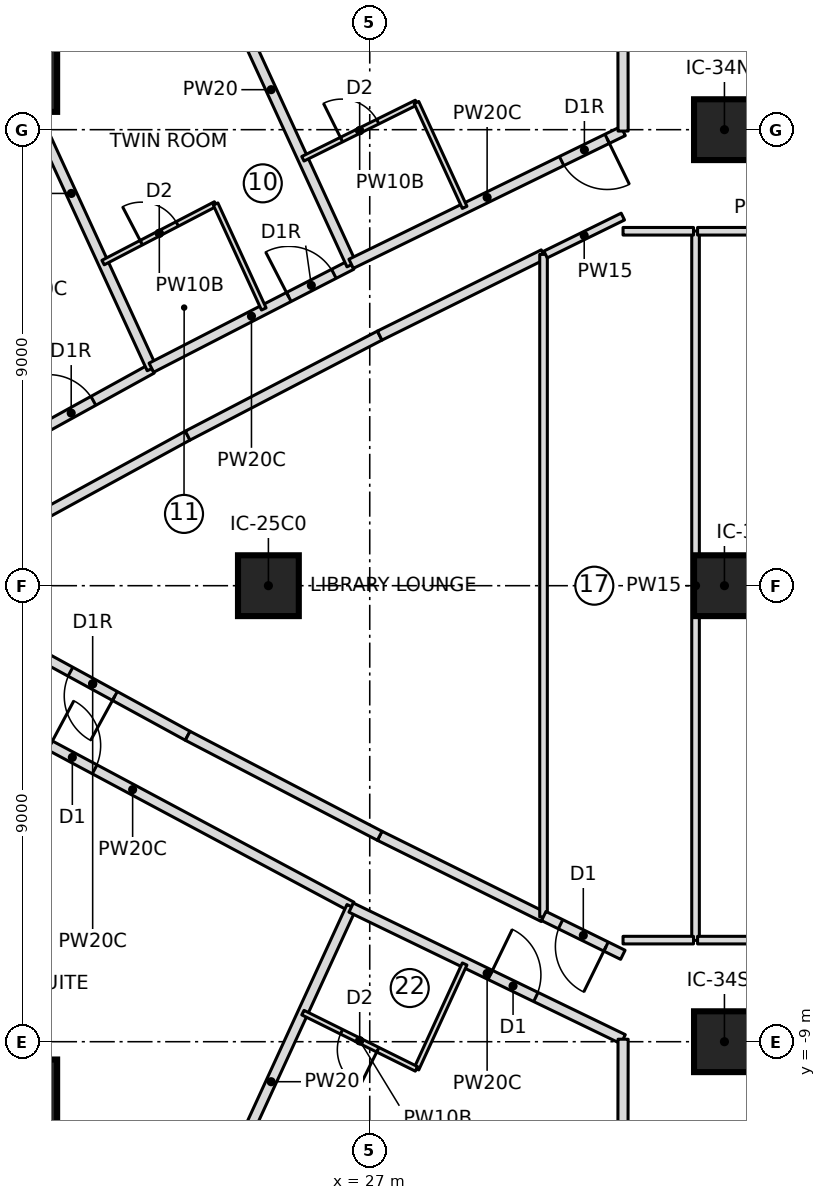
"""IFC4 building model, lengths in metres.
Left out: names, types, materials, properties, quantities, classifications, styles, units other than length and angle.
Written with IfcOpenShell. Run it as: python <this file> out.ifc"""

import sys

from ifc_helpers import new_model, si_unit, direction, frame, frame_2d, origin, origin_2d, place, context, subcontext, project, spatial, rectangle, extrude, element, fill, save


model = new_model("IFC4")
c1 = context("Model", 3, precision=1e-05, world=origin(), true_north=direction((0.0, 1.0)))
c2 = subcontext(c1, "Body", "Model", "MODEL_VIEW")
j1 = project(units=[si_unit("LENGTHUNIT", "METRE"), si_unit("PLANEANGLEUNIT", "RADIAN")], contexts=[c1])
p1 = place(None, origin())
s1 = spatial("IfcSite", under=j1, at=p1, CompositionType="ELEMENT")
p2 = place(p1, origin())
s2 = spatial("IfcBuilding", under=s1, at=p2, CompositionType="ELEMENT")
p3 = place(p2, frame((0.0, 0.0, 84.9)))
s3 = spatial("IfcBuildingStorey", under=s2, at=p3, CompositionType="ELEMENT", Elevation=84.9)
for number, where, z_axis, x_axis in (
    (1, (19.981, -10.202, 0.0), (0.0, 0.0, 1.0), (1.0, 0.0, 0.0)),
    (2, (19.981, 10.202, 0.0), (0.0, 0.0, 1.0), (1.0, 0.0, 0.0)),
):
    element("IfcColumn", number, at=place(p3, frame(where, z_axis=z_axis, x_axis=x_axis)), inside=s3, PredefinedType="COLUMN", context=c2, shape_type="SweptSolid", body=[
        extrude(rectangle(XDim=1.7, YDim=1.7, at=origin_2d()), origin(), (0.0, 0.0, 1.0), 3.55),
    ])
for number, where, z_axis, x_axis in (
    (3, (25.0, 0.0, 0.0), (0.0, 0.0, 1.0), (1.0, 0.0, 0.0)),
    (4, (34.0, -9.0, 0.0), (0.0, 0.0, 1.0), (1.0, 0.0, 0.0)),
    (5, (34.0, 0.0, 0.0), (0.0, 0.0, 1.0), (1.0, 0.0, 0.0)),
    (6, (34.0, 9.0, 0.0), (0.0, 0.0, 1.0), (1.0, 0.0, 0.0)),
):
    element("IfcColumn", number, at=place(p3, frame(where, z_axis=z_axis, x_axis=x_axis)), inside=s3, PredefinedType="COLUMN", context=c2, shape_type="SweptSolid", body=[
        extrude(rectangle(XDim=1.2, YDim=1.2, at=origin_2d()), origin(), (0.0, 0.0, 1.0), 3.55),
    ])
p4 = place(p3, frame((18.0, 1.692, 0.0), z_axis=(0.0, 0.0, 1.0), x_axis=(0.875548487611, 0.483130257634, 0.0)))
e7 = element("IfcWall", 7, at=p4, inside=s3, PredefinedType="PARTITIONING", context=c2, shape_type="SweptSolid", body=[
    extrude(rectangle(XDim=5.367, YDim=0.2, at=frame_2d((2.683, 0.0))), origin(), (0.0, 0.0, 1.0), 3.25),
])
p5 = place(p4, frame((3.05, 0.0, 0.0)))
e8 = element("IfcOpeningElement", 8, at=p5, cuts=e7, PredefinedType="OPENING", context=c2, shape_type="SweptSolid", body=[
    extrude(rectangle(XDim=1.0, YDim=2.1, at=frame_2d((0.5, 1.05))), frame((0.0, 0.11, 0.0), z_axis=(0.0, -1.0, 0.0), x_axis=(1.0, 0.0, 0.0)), (0.0, 0.0, 1.0), 0.22),
])
p6 = place(p3, frame((22.699, 4.284, 0.0), z_axis=(0.0, 0.0, 1.0), x_axis=(-0.417413534969, 0.908716644959, 0.0)))
e9 = element("IfcWall", 9, at=p6, inside=s3, PredefinedType="PARTITIONING", context=c2, shape_type="SweptSolid", body=[
    extrude(rectangle(XDim=7.609, YDim=0.2, at=frame_2d((3.805, 0.0))), origin(), (0.0, 0.0, 1.0), 3.25),
])
p7 = place(p3, frame((22.69, 4.302, 0.0), z_axis=(0.0, 0.0, 1.0), x_axis=(0.889236075961, 0.457448577667, 0.0)))
e10 = element("IfcWall", 10, at=p7, inside=s3, PredefinedType="PARTITIONING", context=c2, shape_type="SweptSolid", body=[
    extrude(rectangle(XDim=4.443, YDim=0.2, at=frame_2d((2.222, 0.0))), origin(), (0.0, 0.0, 1.0), 3.25),
])
p8 = place(p7, frame((3.05, 0.0, 0.0)))
e11 = element("IfcOpeningElement", 11, at=p8, cuts=e10, PredefinedType="OPENING", context=c2, shape_type="SweptSolid", body=[
    extrude(rectangle(XDim=1.0, YDim=2.1, at=frame_2d((0.5, 1.05))), frame((0.0, 0.11, 0.0), z_axis=(0.0, -1.0, 0.0), x_axis=(1.0, 0.0, 0.0)), (0.0, 0.0, 1.0), 0.22),
])
p9 = place(p3, frame((21.738, 6.377, 0.0), z_axis=(0.0, 0.0, 1.0), x_axis=(0.886911586599, 0.461939214135, 0.0)))
e12 = element("IfcWall", 12, at=p9, inside=s3, PredefinedType="PARTITIONING", context=c2, shape_type="SweptSolid", body=[
    extrude(rectangle(XDim=2.503, YDim=0.1, at=frame_2d((1.251, 0.0))), origin(), (0.0, 0.0, 1.0), 3.25),
])
p10 = place(p9, frame((0.85, 0.0, 0.0)))
e13 = element("IfcOpeningElement", 13, at=p10, cuts=e12, PredefinedType="OPENING", context=c2, shape_type="SweptSolid", body=[
    extrude(rectangle(XDim=0.8, YDim=2.1, at=frame_2d((0.4, 1.05))), frame((0.0, 0.06, 0.0), z_axis=(0.0, -1.0, 0.0), x_axis=(1.0, 0.0, 0.0)), (0.0, 0.0, 1.0), 0.12),
])
p11 = place(p3, frame((23.958, 7.533, 0.0), z_axis=(0.0, 0.0, 1.0), x_axis=(0.417454762401, -0.908697706253, 0.0)))
e14 = element("IfcWall", 14, at=p11, inside=s3, PredefinedType="PARTITIONING", context=c2, shape_type="SweptSolid", body=[
    extrude(rectangle(XDim=2.28, YDim=0.1, at=frame_2d((1.14, 0.0))), origin(), (0.0, 0.0, 1.0), 3.25),
])
p12 = place(p3, frame((26.641, 6.335, 0.0), z_axis=(0.0, 0.0, 1.0), x_axis=(-0.417455028008, 0.908697584233, 0.0)))
e15 = element("IfcWall", 15, at=p12, inside=s3, PredefinedType="PARTITIONING", context=c2, shape_type="SweptSolid", body=[
    extrude(rectangle(XDim=7.603, YDim=0.2, at=frame_2d((3.802, 0.0))), origin(), (0.0, 0.0, 1.0), 3.25),
])
p13 = place(p3, frame((32.0, 8.973, 0.0), z_axis=(0.0, 0.0, 1.0), x_axis=(-0.898654091263, -0.438657980956, 0.0)))
e16 = element("IfcWall", 16, at=p13, inside=s3, PredefinedType="PARTITIONING", context=c2, shape_type="SweptSolid", body=[
    extrude(rectangle(XDim=5.972, YDim=0.2, at=frame_2d((2.986, 0.0))), origin(), (0.0, 0.0, 1.0), 3.25),
])
p14 = place(p13, frame((0.35, 0.0, 0.0)))
e17 = element("IfcOpeningElement", 17, at=p14, cuts=e16, PredefinedType="OPENING", context=c2, shape_type="SweptSolid", body=[
    extrude(rectangle(XDim=1.0, YDim=2.1, at=frame_2d((0.5, 1.05))), frame((0.0, 0.11, 0.0), z_axis=(0.0, -1.0, 0.0), x_axis=(1.0, 0.0, 0.0)), (0.0, 0.0, 1.0), 0.22),
])
p15 = place(p3, frame((25.681, 8.426, 0.0), z_axis=(0.0, 0.0, 1.0), x_axis=(0.895944857815, 0.444165297784, 0.0)))
e18 = element("IfcWall", 18, at=p15, inside=s3, PredefinedType="PARTITIONING", context=c2, shape_type="SweptSolid", body=[
    extrude(rectangle(XDim=2.501, YDim=0.1, at=frame_2d((1.25, 0.0))), origin(), (0.0, 0.0, 1.0), 3.25),
])
p16 = place(p15, frame((0.85, 0.0, 0.0)))
e19 = element("IfcOpeningElement", 19, at=p16, cuts=e18, PredefinedType="OPENING", context=c2, shape_type="SweptSolid", body=[
    extrude(rectangle(XDim=0.8, YDim=2.1, at=frame_2d((0.4, 1.05))), frame((0.0, 0.06, 0.0), z_axis=(0.0, -1.0, 0.0), x_axis=(1.0, 0.0, 0.0)), (0.0, 0.0, 1.0), 0.12),
])
p17 = place(p3, frame((27.922, 9.537, 0.0), z_axis=(0.0, 0.0, 1.0), x_axis=(0.417433204355, -0.908707609686, 0.0)))
e20 = element("IfcWall", 20, at=p17, inside=s3, PredefinedType="PARTITIONING", context=c2, shape_type="SweptSolid", body=[
    extrude(rectangle(XDim=2.278, YDim=0.1, at=frame_2d((1.139, 0.0))), origin(), (0.0, 0.0, 1.0), 3.25),
])
p18 = place(p3, frame((18.0, -1.715, 0.0), z_axis=(0.0, 0.0, 1.0), x_axis=(0.881859333365, -0.471512583244, 0.0)))
e21 = element("IfcWall", 21, at=p18, inside=s3, PredefinedType="PARTITIONING", context=c2, shape_type="SweptSolid", body=[
    extrude(rectangle(XDim=9.799, YDim=0.2, at=frame_2d((4.899, 0.0))), origin(), (0.0, 0.0, 1.0), 3.25),
])
p19 = place(p18, frame((3.05, 0.0, 0.0)))
e22 = element("IfcOpeningElement", 22, at=p19, cuts=e21, PredefinedType="OPENING", context=c2, shape_type="SweptSolid", body=[
    extrude(rectangle(XDim=1.0, YDim=2.1, at=frame_2d((0.5, 1.05))), frame((0.0, 0.11, 0.0), z_axis=(0.0, -1.0, 0.0), x_axis=(1.0, 0.0, 0.0)), (0.0, 0.0, 1.0), 0.22),
])
p20 = place(p3, frame((23.467, -13.244, 0.0), z_axis=(0.0, 0.0, 1.0), x_axis=(0.417455028008, 0.908697584233, 0.0)))
e23 = element("IfcWall", 23, at=p20, inside=s3, PredefinedType="PARTITIONING", context=c2, shape_type="SweptSolid", body=[
    extrude(rectangle(XDim=7.603, YDim=0.2, at=frame_2d((3.802, 0.0))), origin(), (0.0, 0.0, 1.0), 3.25),
])
p21 = place(p3, frame((26.633, -6.353, 0.0), z_axis=(0.0, 0.0, 1.0), x_axis=(0.900101763883, -0.435679715679, 0.0)))
e24 = element("IfcWall", 24, at=p21, inside=s3, PredefinedType="PARTITIONING", context=c2, shape_type="SweptSolid", body=[
    extrude(rectangle(XDim=5.963, YDim=0.2, at=frame_2d((2.981, 0.0))), origin(), (0.0, 0.0, 1.0), 3.25),
])
p22 = place(p21, frame((3.05, 0.0, 0.0)))
e25 = element("IfcOpeningElement", 25, at=p22, cuts=e24, PredefinedType="OPENING", context=c2, shape_type="SweptSolid", body=[
    extrude(rectangle(XDim=1.0, YDim=2.1, at=frame_2d((0.5, 1.05))), frame((0.0, 0.11, 0.0), z_axis=(0.0, -1.0, 0.0), x_axis=(1.0, 0.0, 0.0)), (0.0, 0.0, 1.0), 0.22),
])
p23 = place(p3, frame((28.873, -7.467, 0.0), z_axis=(0.0, 0.0, 1.0), x_axis=(-0.417433204355, -0.908707609686, 0.0)))
e26 = element("IfcWall", 26, at=p23, inside=s3, PredefinedType="PARTITIONING", context=c2, shape_type="SweptSolid", body=[
    extrude(rectangle(XDim=2.278, YDim=0.1, at=frame_2d((1.139, 0.0))), origin(), (0.0, 0.0, 1.0), 3.25),
])
p24 = place(p3, frame((27.922, -9.537, 0.0), z_axis=(0.0, 0.0, 1.0), x_axis=(-0.895944857815, 0.444165297784, 0.0)))
e27 = element("IfcWall", 27, at=p24, inside=s3, PredefinedType="PARTITIONING", context=c2, shape_type="SweptSolid", body=[
    extrude(rectangle(XDim=2.501, YDim=0.1, at=frame_2d((1.25, 0.0))), origin(), (0.0, 0.0, 1.0), 3.25),
])
p25 = place(p24, frame((0.85, 0.0, 0.0)))
e28 = element("IfcOpeningElement", 28, at=p25, cuts=e27, PredefinedType="OPENING", context=c2, shape_type="SweptSolid", body=[
    extrude(rectangle(XDim=0.8, YDim=2.1, at=frame_2d((0.4, 1.05))), frame((0.0, 0.06, 0.0), z_axis=(0.0, -1.0, 0.0), x_axis=(1.0, 0.0, 0.0)), (0.0, 0.0, 1.0), 0.12),
])
p26 = place(p3, frame((23.407, -2.962, 0.0), z_axis=(0.0, 0.0, 1.0), x_axis=(-0.877465075585, 0.479640533242, 0.0)))
e29 = element("IfcWall", 29, at=p26, inside=s3, PredefinedType="PARTITIONING", context=c2, shape_type="SweptSolid", body=[
    extrude(rectangle(XDim=4.273, YDim=0.2, at=frame_2d((2.137, 0.0))), origin(), (0.0, 0.0, 1.0), 3.25),
])
p27 = place(p26, frame((1.636, 0.0, 0.0)))
e30 = element("IfcOpeningElement", 30, at=p27, cuts=e29, PredefinedType="OPENING", context=c2, shape_type="SweptSolid", body=[
    extrude(rectangle(XDim=1.0, YDim=2.1, at=frame_2d((0.5, 1.05))), frame((0.0, 0.11, 0.0), z_axis=(0.0, -1.0, 0.0), x_axis=(1.0, 0.0, 0.0)), (0.0, 0.0, 1.0), 0.22),
])
p28 = place(p3, frame((30.43, -6.539, 0.0), z_axis=(0.0, 0.0, 1.0), x_axis=(-0.895964304417, 0.44412606905, 0.0)))
e31 = element("IfcWall", 31, at=p28, inside=s3, PredefinedType="PARTITIONING", context=c2, shape_type="SweptSolid", body=[
    extrude(rectangle(XDim=3.609, YDim=0.2, at=frame_2d((1.804, 0.0))), origin(), (0.0, 0.0, 1.0), 3.25),
])
p29 = place(p3, frame((27.196, -4.936, 0.0), z_axis=(0.0, 0.0, 1.0), x_axis=(-0.886899452904, 0.461962509775, 0.0)))
e32 = element("IfcWall", 32, at=p29, inside=s3, PredefinedType="PARTITIONING", context=c2, shape_type="SweptSolid", body=[
    extrude(rectangle(XDim=4.273, YDim=0.2, at=frame_2d((2.136, 0.0))), origin(), (0.0, 0.0, 1.0), 3.25),
])
p30 = place(p3, frame((19.657, 0.912, 0.0), z_axis=(0.0, 0.0, 1.0), x_axis=(0.877465075585, 0.479640533242, 0.0)))
e33 = element("IfcWall", 33, at=p30, inside=s3, PredefinedType="PARTITIONING", context=c2, shape_type="SweptSolid", body=[
    extrude(rectangle(XDim=4.273, YDim=0.2, at=frame_2d((2.137, 0.0))), origin(), (0.0, 0.0, 1.0), 3.25),
])
p31 = place(p3, frame((23.407, 2.962, 0.0), z_axis=(0.0, 0.0, 1.0), x_axis=(0.886899452904, 0.461962509775, 0.0)))
e34 = element("IfcWall", 34, at=p31, inside=s3, PredefinedType="PARTITIONING", context=c2, shape_type="SweptSolid", body=[
    extrude(rectangle(XDim=4.273, YDim=0.2, at=frame_2d((2.136, 0.0))), origin(), (0.0, 0.0, 1.0), 3.25),
])
p32 = place(p3, frame((27.196, 4.936, 0.0), z_axis=(0.0, 0.0, 1.0), x_axis=(0.895964304417, 0.44412606905, 0.0)))
e35 = element("IfcWall", 35, at=p32, inside=s3, PredefinedType="PARTITIONING", context=c2, shape_type="SweptSolid", body=[
    extrude(rectangle(XDim=3.609, YDim=0.2, at=frame_2d((1.804, 0.0))), origin(), (0.0, 0.0, 1.0), 3.25),
])
p33 = place(p3, frame((30.43, -6.539, 0.0), z_axis=(0.0, 0.0, 1.0), x_axis=(0.0, 1.0, 0.0)))
e36 = element("IfcWall", 36, at=p33, inside=s3, PredefinedType="PARTITIONING", context=c2, shape_type="SweptSolid", body=[
    extrude(rectangle(XDim=13.077, YDim=0.15, at=frame_2d((6.539, 0.0))), origin(), (0.0, 0.0, 1.0), 3.25),
])
p34 = place(p3, frame((33.43, -7.0, 0.0), z_axis=(0.0, 0.0, 1.0), x_axis=(0.0, 1.0, 0.0)))
e37 = element("IfcWall", 37, at=p34, inside=s3, PredefinedType="PARTITIONING", context=c2, shape_type="SweptSolid", body=[
    extrude(rectangle(XDim=14.0, YDim=0.15, at=frame_2d((7.0, 0.0))), origin(), (0.0, 0.0, 1.0), 3.25),
])
p35 = place(p3, frame((31.995, -7.285, 0.0), z_axis=(0.0, 0.0, 1.0), x_axis=(-0.897771601508, 0.440461294015, 0.0)))
e38 = element("IfcWall", 38, at=p35, inside=s3, PredefinedType="PARTITIONING", context=c2, shape_type="SweptSolid", body=[
    extrude(rectangle(XDim=1.739, YDim=0.2, at=frame_2d((0.869, 0.0))), origin(), (0.0, 0.0, 1.0), 3.25),
])
p36 = place(p35, frame((0.369, 0.0, 0.0)))
e39 = element("IfcOpeningElement", 39, at=p36, cuts=e38, PredefinedType="OPENING", context=c2, shape_type="SweptSolid", body=[
    extrude(rectangle(XDim=1.0, YDim=2.1, at=frame_2d((0.5, 1.05))), frame((0.0, 0.11, 0.0), z_axis=(0.0, -1.0, 0.0), x_axis=(1.0, 0.0, 0.0)), (0.0, 0.0, 1.0), 0.22),
])
p37 = place(p3, frame((33.39, -6.995, 0.0), z_axis=(0.0, 0.0, 1.0), x_axis=(-1.0, 0.0, 0.0)))
e40 = element("IfcWall", 40, at=p37, inside=s3, PredefinedType="PARTITIONING", context=c2, shape_type="SweptSolid", body=[
    extrude(rectangle(XDim=1.391, YDim=0.15, at=frame_2d((0.695, 0.0))), origin(), (0.0, 0.0, 1.0), 3.25),
])
p38 = place(p3, frame((30.47, 6.536, 0.0), z_axis=(0.0, 0.0, 1.0), x_axis=(0.897735805555, 0.440534247732, 0.0)))
e41 = element("IfcWall", 41, at=p38, inside=s3, PredefinedType="PARTITIONING", context=c2, shape_type="SweptSolid", body=[
    extrude(rectangle(XDim=1.699, YDim=0.15, at=frame_2d((0.85, 0.0))), origin(), (0.0, 0.0, 1.0), 3.25),
])
p39 = place(p3, frame((31.999, 6.995, 0.0), z_axis=(0.0, 0.0, 1.0), x_axis=(1.0, 0.0, 0.0)))
e42 = element("IfcWall", 42, at=p39, inside=s3, PredefinedType="PARTITIONING", context=c2, shape_type="SweptSolid", body=[
    extrude(rectangle(XDim=1.391, YDim=0.15, at=frame_2d((0.695, 0.0))), origin(), (0.0, 0.0, 1.0), 3.25),
])
p40 = place(p3, frame((35.963, -6.996, 0.0), z_axis=(0.0, 0.0, 1.0), x_axis=(-0.999999956849, 0.00029377202, 0.0)))
e43 = element("IfcWall", 43, at=p40, inside=s3, PredefinedType="PARTITIONING", context=c2, shape_type="SweptSolid", body=[
    extrude(rectangle(XDim=2.493, YDim=0.15, at=frame_2d((1.247, 0.0))), origin(), (0.0, 0.0, 1.0), 3.25),
])
p41 = place(p3, frame((33.47, 6.995, 0.0), z_axis=(0.0, 0.0, 1.0), x_axis=(0.999999958194, 0.000289156614, 0.0)))
e44 = element("IfcWall", 44, at=p41, inside=s3, PredefinedType="PARTITIONING", context=c2, shape_type="SweptSolid", body=[
    extrude(rectangle(XDim=2.533, YDim=0.15, at=frame_2d((1.267, 0.0))), origin(), (0.0, 0.0, 1.0), 3.25),
])
p42 = place(p3, frame((31.997, 11.004, 0.0), z_axis=(0.0, 0.0, 1.0), x_axis=(0.001322114229, -0.999999126007, 0.0)))
e45 = element("IfcWall", 45, at=p42, inside=s3, PredefinedType="PARTITIONING", context=c2, shape_type="SweptSolid", body=[
    extrude(rectangle(XDim=2.031, YDim=0.2, at=frame_2d((1.016, 0.0))), origin(), (0.0, 0.0, 1.0), 3.25),
])
p43 = place(p3, frame((32.0, -8.951, 0.0), z_axis=(0.0, 0.0, 1.0), x_axis=(-0.001307965587, -0.999999144613, 0.0)))
e46 = element("IfcWall", 46, at=p43, inside=s3, PredefinedType="PARTITIONING", context=c2, shape_type="SweptSolid", body=[
    extrude(rectangle(XDim=2.053, YDim=0.2, at=frame_2d((1.027, 0.0))), origin(), (0.0, 0.0, 1.0), 3.25),
])
p44 = place(p5, origin())
e47 = element("IfcDoor", 47, at=p44, inside=s3, OperationType="SINGLE_SWING_RIGHT", PredefinedType="DOOR", context=c2, shape_type="SweptSolid", body=[
    extrude(rectangle(XDim=1.0, YDim=2.1, at=frame_2d((0.5, 1.05))), frame((0.0, 0.025, 0.0), z_axis=(0.0, -1.0, 0.0), x_axis=(1.0, 0.0, 0.0)), (0.0, 0.0, 1.0), 0.05),
])
fill(e8, e47)
p45 = place(p10, origin())
e48 = element("IfcDoor", 48, at=p45, inside=s3, OperationType="SINGLE_SWING_LEFT", PredefinedType="DOOR", context=c2, shape_type="SweptSolid", body=[
    extrude(rectangle(XDim=0.8, YDim=2.1, at=frame_2d((0.4, 1.05))), frame((0.0, 0.025, 0.0), z_axis=(0.0, -1.0, 0.0), x_axis=(1.0, 0.0, 0.0)), (0.0, 0.0, 1.0), 0.05),
])
fill(e13, e48)
p46 = place(p8, origin())
e49 = element("IfcDoor", 49, at=p46, inside=s3, OperationType="SINGLE_SWING_RIGHT", PredefinedType="DOOR", context=c2, shape_type="SweptSolid", body=[
    extrude(rectangle(XDim=1.0, YDim=2.1, at=frame_2d((0.5, 1.05))), frame((0.0, 0.025, 0.0), z_axis=(0.0, -1.0, 0.0), x_axis=(1.0, 0.0, 0.0)), (0.0, 0.0, 1.0), 0.05),
])
fill(e11, e49)
p47 = place(p16, origin())
e50 = element("IfcDoor", 50, at=p47, inside=s3, OperationType="SINGLE_SWING_LEFT", PredefinedType="DOOR", context=c2, shape_type="SweptSolid", body=[
    extrude(rectangle(XDim=0.8, YDim=2.1, at=frame_2d((0.4, 1.05))), frame((0.0, 0.025, 0.0), z_axis=(0.0, -1.0, 0.0), x_axis=(1.0, 0.0, 0.0)), (0.0, 0.0, 1.0), 0.05),
])
fill(e19, e50)
p48 = place(p14, origin())
e51 = element("IfcDoor", 51, at=p48, inside=s3, OperationType="SINGLE_SWING_RIGHT", PredefinedType="DOOR", context=c2, shape_type="SweptSolid", body=[
    extrude(rectangle(XDim=1.0, YDim=2.1, at=frame_2d((0.5, 1.05))), frame((0.0, 0.025, 0.0), z_axis=(0.0, -1.0, 0.0), x_axis=(1.0, 0.0, 0.0)), (0.0, 0.0, 1.0), 0.05),
])
fill(e17, e51)
p49 = place(p19, origin())
e52 = element("IfcDoor", 52, at=p49, inside=s3, OperationType="SINGLE_SWING_LEFT", PredefinedType="DOOR", context=c2, shape_type="SweptSolid", body=[
    extrude(rectangle(XDim=1.0, YDim=2.1, at=frame_2d((0.5, 1.05))), frame((0.0, 0.025, 0.0), z_axis=(0.0, -1.0, 0.0), x_axis=(1.0, 0.0, 0.0)), (0.0, 0.0, 1.0), 0.05),
])
fill(e22, e52)
p50 = place(p25, origin())
e53 = element("IfcDoor", 53, at=p50, inside=s3, OperationType="SINGLE_SWING_LEFT", PredefinedType="DOOR", context=c2, shape_type="SweptSolid", body=[
    extrude(rectangle(XDim=0.8, YDim=2.1, at=frame_2d((0.4, 1.05))), frame((0.0, 0.025, 0.0), z_axis=(0.0, -1.0, 0.0), x_axis=(1.0, 0.0, 0.0)), (0.0, 0.0, 1.0), 0.05),
])
fill(e28, e53)
p51 = place(p22, origin())
e54 = element("IfcDoor", 54, at=p51, inside=s3, OperationType="SINGLE_SWING_LEFT", PredefinedType="DOOR", context=c2, shape_type="SweptSolid", body=[
    extrude(rectangle(XDim=1.0, YDim=2.1, at=frame_2d((0.5, 1.05))), frame((0.0, 0.025, 0.0), z_axis=(0.0, -1.0, 0.0), x_axis=(1.0, 0.0, 0.0)), (0.0, 0.0, 1.0), 0.05),
])
fill(e25, e54)
p52 = place(p27, origin())
e55 = element("IfcDoor", 55, at=p52, inside=s3, OperationType="SINGLE_SWING_RIGHT", PredefinedType="DOOR", context=c2, shape_type="SweptSolid", body=[
    extrude(rectangle(XDim=1.0, YDim=2.1, at=frame_2d((0.5, 1.05))), frame((0.0, 0.025, 0.0), z_axis=(0.0, -1.0, 0.0), x_axis=(1.0, 0.0, 0.0)), (0.0, 0.0, 1.0), 0.05),
])
fill(e30, e55)
p53 = place(p36, origin())
e56 = element("IfcDoor", 56, at=p53, inside=s3, OperationType="SINGLE_SWING_LEFT", PredefinedType="DOOR", context=c2, shape_type="SweptSolid", body=[
    extrude(rectangle(XDim=1.0, YDim=2.1, at=frame_2d((0.5, 1.05))), frame((0.0, 0.025, 0.0), z_axis=(0.0, -1.0, 0.0), x_axis=(1.0, 0.0, 0.0)), (0.0, 0.0, 1.0), 0.05),
])
fill(e39, e56)
save(model, sys.argv[1])
